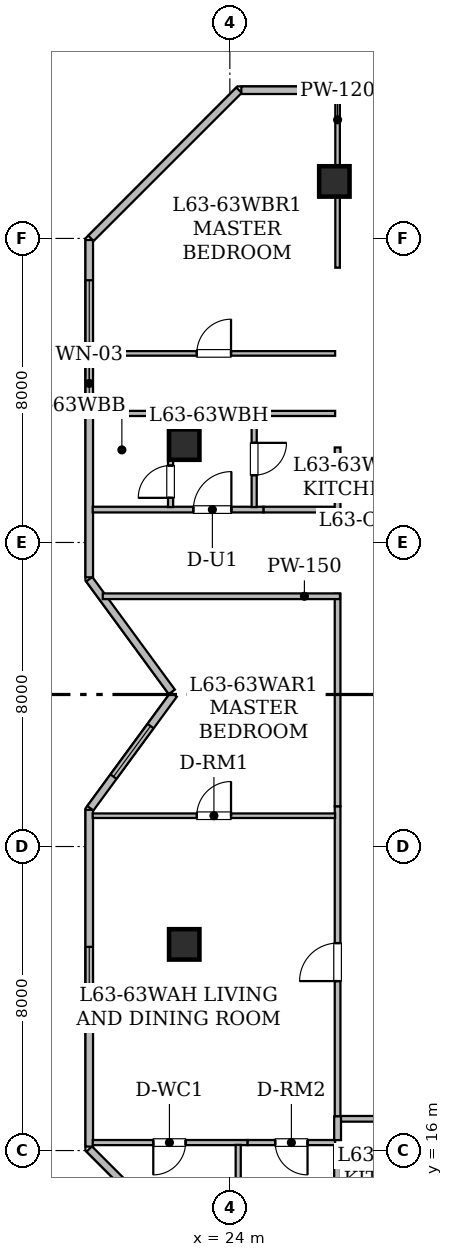
"""IFC4 building model, lengths in metres.
Left out: names, types, materials, properties, quantities, classifications, styles, units other than length and angle.
Written with IfcOpenShell. Run it as: python <this file> out.ifc"""

import sys

from ifc_helpers import new_model, si_unit, direction, frame, frame_2d, origin, origin_2d, place, context, subcontext, project, spatial, rectangle, hollow_rectangle, extrude, element, fill, save


model = new_model("IFC4")
c1 = context("Model", 3, precision=1e-05, world=origin(), true_north=direction((0.0, 1.0)))
c2 = subcontext(c1, "Body", "Model", "MODEL_VIEW")
j1 = project(units=[si_unit("LENGTHUNIT", "METRE"), si_unit("PLANEANGLEUNIT", "RADIAN")], contexts=[c1])
p1 = place(None, origin())
s1 = spatial("IfcSite", under=j1, at=p1, CompositionType="ELEMENT")
p2 = place(p1, origin())
s2 = spatial("IfcBuilding", under=s1, at=p2, CompositionType="ELEMENT")
p3 = place(p2, frame((0.0, 0.0, 246.4)))
s3 = spatial("IfcBuildingStorey", under=s2, at=p3, CompositionType="ELEMENT", Elevation=246.4)
for number, where, z_axis, x_axis in (
    (1, (26.75, 41.5, 0.0), (0.0, 0.0, 1.0), (1.0, 0.0, 0.0)),
    (2, (22.8, 21.425, 0.0), (0.0, 0.0, 1.0), (1.0, 0.0, 0.0)),
    (3, (22.8, 34.575, 0.0), (0.0, 0.0, 1.0), (1.0, 0.0, 0.0)),
):
    element("IfcColumn", number, at=place(p3, frame(where, z_axis=z_axis, x_axis=x_axis)), inside=s3, PredefinedType="COLUMN", context=c2, shape_type="SweptSolid", body=[
        extrude(hollow_rectangle(XDim=0.8, YDim=0.8, WallThickness=0.04, at=origin_2d()), origin(), (0.0, 0.0, 1.0), 3.65),
    ])
p4 = place(p3, frame((24.241, 12.1, 0.0), z_axis=(0.0, 0.0, 1.0), x_axis=(-0.707106781187, 0.707106781187, 0.0)))
e4 = element("IfcWall", 4, at=p4, inside=s3, PredefinedType="STANDARD", context=c2, shape_type="SweptSolid", body=[
    extrude(rectangle(XDim=5.573, YDim=0.2, at=frame_2d((2.787, 0.0))), origin(), (0.0, 0.0, 1.0), 3.43),
])
p5 = place(p3, frame((20.3, 16.104, 0.0), z_axis=(0.0, 0.0, 1.0), x_axis=(0.0, 1.0, 0.0)))
e5 = element("IfcWall", 5, at=p5, inside=s3, PredefinedType="STANDARD", context=c2, shape_type="SweptSolid", body=[
    extrude(rectangle(XDim=8.863, YDim=0.2, at=frame_2d((4.432, 0.0))), origin(), (0.0, 0.0, 1.0), 3.43),
])
p6 = place(p5, frame((3.606, 0.0, 0.85)))
e6 = element("IfcOpeningElement", 6, at=p6, cuts=e5, PredefinedType="OPENING", context=c2, shape_type="SweptSolid", body=[
    extrude(rectangle(XDim=1.65, YDim=1.55, at=frame_2d((0.825, 0.775))), frame((0.0, 0.11, 0.0), z_axis=(0.0, -1.0, 0.0), x_axis=(1.0, 0.0, 0.0)), (0.0, 0.0, 1.0), 0.22),
])
p7 = place(p3, frame((20.329, 25.007, 0.0), z_axis=(0.0, 0.0, 1.0), x_axis=(0.591366515379, 0.806402904564, 0.0)))
e7 = element("IfcWall", 7, at=p7, inside=s3, PredefinedType="STANDARD", context=c2, shape_type="SweptSolid", body=[
    extrude(rectangle(XDim=3.711, YDim=0.2, at=frame_2d((1.856, 0.0))), origin(), (0.0, 0.0, 1.0), 3.43),
])
p8 = place(p7, frame((1.031, 0.0, 0.85)))
e8 = element("IfcOpeningElement", 8, at=p8, cuts=e7, PredefinedType="OPENING", context=c2, shape_type="SweptSolid", body=[
    extrude(rectangle(XDim=1.65, YDim=1.55, at=frame_2d((0.825, 0.775))), frame((0.0, 0.11, 0.0), z_axis=(0.0, -1.0, 0.0), x_axis=(1.0, 0.0, 0.0)), (0.0, 0.0, 1.0), 0.22),
])
p9 = place(p3, frame((22.473, 28.069, 0.0), z_axis=(0.0, 0.0, 1.0), x_axis=(-0.591248456881, 0.80648946815, 0.0)))
e9 = element("IfcWall", 9, at=p9, inside=s3, PredefinedType="STANDARD", context=c2, shape_type="SweptSolid", body=[
    extrude(rectangle(XDim=3.675, YDim=0.2, at=frame_2d((1.837, 0.0))), origin(), (0.0, 0.0, 1.0), 3.43),
])
p10 = place(p3, frame((20.3, 31.084, 0.0), z_axis=(0.0, 0.0, 1.0), x_axis=(0.0, 1.0, 0.0)))
e10 = element("IfcWall", 10, at=p10, inside=s3, PredefinedType="STANDARD", context=c2, shape_type="SweptSolid", body=[
    extrude(rectangle(XDim=8.875, YDim=0.2, at=frame_2d((4.438, 0.0))), origin(), (0.0, 0.0, 1.0), 3.43),
])
p11 = place(p10, frame((4.501, 0.0, 0.8)))
e11 = element("IfcOpeningElement", 11, at=p11, cuts=e10, PredefinedType="OPENING", context=c2, shape_type="SweptSolid", body=[
    extrude(rectangle(XDim=1.2, YDim=1.5, at=frame_2d((0.6, 0.75))), frame((0.0, 0.11, 0.0), z_axis=(0.0, -1.0, 0.0), x_axis=(1.0, 0.0, 0.0)), (0.0, 0.0, 1.0), 0.22),
])
p12 = place(p10, frame((6.166, 0.0, 0.85)))
e12 = element("IfcOpeningElement", 12, at=p12, cuts=e10, PredefinedType="OPENING", context=c2, shape_type="SweptSolid", body=[
    extrude(rectangle(XDim=1.65, YDim=1.55, at=frame_2d((0.825, 0.775))), frame((0.0, 0.11, 0.0), z_axis=(0.0, -1.0, 0.0), x_axis=(1.0, 0.0, 0.0)), (0.0, 0.0, 1.0), 0.22),
])
p13 = place(p3, frame((20.344, 40.003, 0.0), z_axis=(0.0, 0.0, 1.0), x_axis=(0.707106781187, 0.707106781187, 0.0)))
e13 = element("IfcWall", 13, at=p13, inside=s3, PredefinedType="STANDARD", context=c2, shape_type="SweptSolid", body=[
    extrude(rectangle(XDim=5.511, YDim=0.2, at=frame_2d((2.756, 0.0))), origin(), (0.0, 0.0, 1.0), 3.43),
])
p14 = place(p3, frame((24.302, 43.9, 0.0), z_axis=(0.0, 0.0, 1.0), x_axis=(1.0, 0.0, 0.0)))
e14 = element("IfcWall", 14, at=p14, inside=s3, PredefinedType="STANDARD", context=c2, shape_type="SweptSolid", body=[
    extrude(rectangle(XDim=41.457, YDim=0.2, at=frame_2d((20.729, 0.0))), origin(), (0.0, 0.0, 1.0), 3.43),
])
p15 = place(p14, frame((4.673, 0.0, 0.85)))
e15 = element("IfcOpeningElement", 15, at=p15, cuts=e14, PredefinedType="OPENING", context=c2, shape_type="SweptSolid", body=[
    extrude(rectangle(XDim=1.65, YDim=1.55, at=frame_2d((0.825, 0.775))), frame((0.0, 0.11, 0.0), z_axis=(0.0, -1.0, 0.0), x_axis=(1.0, 0.0, 0.0)), (0.0, 0.0, 1.0), 0.22),
])
p16 = place(p14, frame((12.063, 0.0, 0.85)))
e16 = element("IfcOpeningElement", 16, at=p16, cuts=e14, PredefinedType="OPENING", context=c2, shape_type="SweptSolid", body=[
    extrude(rectangle(XDim=1.65, YDim=1.55, at=frame_2d((0.825, 0.775))), frame((0.0, 0.11, 0.0), z_axis=(0.0, -1.0, 0.0), x_axis=(1.0, 0.0, 0.0)), (0.0, 0.0, 1.0), 0.22),
])
p17 = place(p14, frame((14.905, 0.0, 0.85)))
e17 = element("IfcOpeningElement", 17, at=p17, cuts=e14, PredefinedType="OPENING", context=c2, shape_type="SweptSolid", body=[
    extrude(rectangle(XDim=1.65, YDim=1.55, at=frame_2d((0.825, 0.775))), frame((0.0, 0.11, 0.0), z_axis=(0.0, -1.0, 0.0), x_axis=(1.0, 0.0, 0.0)), (0.0, 0.0, 1.0), 0.22),
])
p18 = place(p14, frame((17.825, 0.0, 0.85)))
e18 = element("IfcOpeningElement", 18, at=p18, cuts=e14, PredefinedType="OPENING", context=c2, shape_type="SweptSolid", body=[
    extrude(rectangle(XDim=1.65, YDim=1.55, at=frame_2d((0.825, 0.775))), frame((0.0, 0.11, 0.0), z_axis=(0.0, -1.0, 0.0), x_axis=(1.0, 0.0, 0.0)), (0.0, 0.0, 1.0), 0.22),
])
p19 = place(p14, frame((20.176, 0.0, 0.8)))
e19 = element("IfcOpeningElement", 19, at=p19, cuts=e14, PredefinedType="OPENING", context=c2, shape_type="SweptSolid", body=[
    extrude(rectangle(XDim=1.2, YDim=1.5, at=frame_2d((0.6, 0.75))), frame((0.0, 0.11, 0.0), z_axis=(0.0, -1.0, 0.0), x_axis=(1.0, 0.0, 0.0)), (0.0, 0.0, 1.0), 0.22),
])
p20 = place(p14, frame((22.605, 0.0, 0.85)))
e20 = element("IfcOpeningElement", 20, at=p20, cuts=e14, PredefinedType="OPENING", context=c2, shape_type="SweptSolid", body=[
    extrude(rectangle(XDim=1.65, YDim=1.55, at=frame_2d((0.825, 0.775))), frame((0.0, 0.11, 0.0), z_axis=(0.0, -1.0, 0.0), x_axis=(1.0, 0.0, 0.0)), (0.0, 0.0, 1.0), 0.22),
])
p21 = place(p14, frame((26.664, 0.0, 0.85)))
e21 = element("IfcOpeningElement", 21, at=p21, cuts=e14, PredefinedType="OPENING", context=c2, shape_type="SweptSolid", body=[
    extrude(rectangle(XDim=1.65, YDim=1.55, at=frame_2d((0.825, 0.775))), frame((0.0, 0.11, 0.0), z_axis=(0.0, -1.0, 0.0), x_axis=(1.0, 0.0, 0.0)), (0.0, 0.0, 1.0), 0.22),
])
p22 = place(p14, frame((32.408, 0.0, 0.85)))
e22 = element("IfcOpeningElement", 22, at=p22, cuts=e14, PredefinedType="OPENING", context=c2, shape_type="SweptSolid", body=[
    extrude(rectangle(XDim=1.65, YDim=1.55, at=frame_2d((0.825, 0.775))), frame((0.0, 0.11, 0.0), z_axis=(0.0, -1.0, 0.0), x_axis=(1.0, 0.0, 0.0)), (0.0, 0.0, 1.0), 0.22),
])
p23 = place(p14, frame((38.688, 0.0, 0.85)))
e23 = element("IfcOpeningElement", 23, at=p23, cuts=e14, PredefinedType="OPENING", context=c2, shape_type="SweptSolid", body=[
    extrude(rectangle(XDim=1.65, YDim=1.55, at=frame_2d((0.825, 0.775))), frame((0.0, 0.11, 0.0), z_axis=(0.0, -1.0, 0.0), x_axis=(1.0, 0.0, 0.0)), (0.0, 0.0, 1.0), 0.22),
])
p24 = place(p3, frame((26.835, 16.9, 0.0), z_axis=(0.0, 0.0, 1.0), x_axis=(0.0, 1.0, 0.0)))
e24 = element("IfcWall", 24, at=p24, inside=s3, PredefinedType="STANDARD", context=c2, shape_type="SweptSolid", body=[
    extrude(rectangle(XDim=8.159, YDim=0.15, at=frame_2d((4.08, 0.0))), origin(), (0.0, 0.0, 1.0), 2.687),
])
p25 = place(p24, frame((3.559, 0.0, 0.0)))
e25 = element("IfcOpeningElement", 25, at=p25, cuts=e24, PredefinedType="OPENING", context=c2, shape_type="SweptSolid", body=[
    extrude(rectangle(XDim=1.0, YDim=2.15, at=frame_2d((0.5, 1.075))), frame((0.0, 0.085, 0.0), z_axis=(0.0, -1.0, 0.0), x_axis=(1.0, 0.0, 0.0)), (0.0, 0.0, 1.0), 0.17),
])
p26 = place(p3, frame((26.835, 25.059, 0.0), z_axis=(0.0, 0.0, 1.0), x_axis=(0.0, 1.0, 0.0)))
e26 = element("IfcWall", 26, at=p26, inside=s3, PredefinedType="STANDARD", context=c2, shape_type="SweptSolid", body=[
    extrude(rectangle(XDim=5.591, YDim=0.15, at=frame_2d((2.795, 0.0))), origin(), (0.0, 0.0, 1.0), 3.43),
])
p27 = place(p3, frame((26.898, 30.585, 0.0), z_axis=(0.0, 0.0, 1.0), x_axis=(-1.0, 0.0, 0.0)))
e27 = element("IfcWall", 27, at=p27, inside=s3, PredefinedType="STANDARD", context=c2, shape_type="SweptSolid", body=[
    extrude(rectangle(XDim=6.242, YDim=0.15, at=frame_2d((3.121, 0.0))), origin(), (0.0, 0.0, 1.0), 2.887),
])
p28 = place(p3, frame((20.392, 32.865, 0.0), z_axis=(0.0, 0.0, 1.0), x_axis=(1.0, 0.0, 0.0)))
e28 = element("IfcWall", 28, at=p28, inside=s3, PredefinedType="STANDARD", context=c2, shape_type="SweptSolid", body=[
    extrude(rectangle(XDim=4.497, YDim=0.15, at=frame_2d((2.249, 0.0))), origin(), (0.0, 0.0, 1.0), 2.887),
])
p29 = place(p28, frame((2.648, 0.0, 0.0)))
e29 = element("IfcOpeningElement", 29, at=p29, cuts=e28, PredefinedType="OPENING", context=c2, shape_type="SweptSolid", body=[
    extrude(rectangle(XDim=1.0, YDim=2.15, at=frame_2d((0.5, 1.075))), frame((0.0, 0.085, 0.0), z_axis=(0.0, -1.0, 0.0), x_axis=(1.0, 0.0, 0.0)), (0.0, 0.0, 1.0), 0.17),
])
p30 = place(p3, frame((24.889, 32.865, 0.0), z_axis=(0.0, 0.0, 1.0), x_axis=(1.0, 0.0, 0.0)))
e30 = element("IfcWall", 30, at=p30, inside=s3, PredefinedType="STANDARD", context=c2, shape_type="SweptSolid", body=[
    extrude(rectangle(XDim=2.011, YDim=0.15, at=frame_2d((1.005, 0.0))), origin(), (0.0, 0.0, 1.0), 3.43),
])
p31 = place(p3, frame((26.835, 32.8, 0.0), z_axis=(0.0, 0.0, 1.0), x_axis=(0.0, 1.0, 0.0)))
e31 = element("IfcWall", 31, at=p31, inside=s3, PredefinedType="STANDARD", context=c2, shape_type="SweptSolid", body=[
    extrude(rectangle(XDim=1.7, YDim=0.15, at=frame_2d((0.85, 0.0))), origin(), (0.0, 0.0, 1.0), 2.957),
])
p32 = place(p3, frame((30.751, 16.835, 0.0), z_axis=(0.0, 0.0, 1.0), x_axis=(-1.0, 0.0, 0.0)))
e32 = element("IfcWall", 32, at=p32, inside=s3, PredefinedType="STANDARD", context=c2, shape_type="SweptSolid", body=[
    extrude(rectangle(XDim=3.851, YDim=0.15, at=frame_2d((1.926, 0.0))), origin(), (0.0, 0.0, 1.0), 2.725),
])
p33 = place(p3, frame((26.835, 39.23, 0.0), z_axis=(0.0, 0.0, 1.0), x_axis=(0.0, 1.0, 0.0)))
e33 = element("IfcWall", 33, at=p33, inside=s3, PredefinedType="PARTITIONING", context=c2, shape_type="SweptSolid", body=[
    extrude(rectangle(XDim=4.578, YDim=0.12, at=frame_2d((2.289, 0.0))), origin(), (0.0, 0.0, 1.0), 2.725),
])
p34 = place(p3, frame((24.469, 16.21, 0.0), z_axis=(0.0, 0.0, 1.0), x_axis=(-1.0, 0.0, 0.0)))
e34 = element("IfcWall", 34, at=p34, inside=s3, PredefinedType="PARTITIONING", context=c2, shape_type="SweptSolid", body=[
    extrude(rectangle(XDim=4.077, YDim=0.135, at=frame_2d((2.039, 0.0))), origin(), (0.0, 0.0, 1.0), 3.43),
])
p35 = place(p34, frame((1.634, 0.0, 0.0)))
e35 = element("IfcOpeningElement", 35, at=p35, cuts=e34, PredefinedType="OPENING", context=c2, shape_type="SweptSolid", body=[
    extrude(rectangle(XDim=0.85, YDim=2.1, at=frame_2d((0.425, 1.05))), frame((0.0, 0.077, 0.0), z_axis=(0.0, -1.0, 0.0), x_axis=(1.0, 0.0, 0.0)), (0.0, 0.0, 1.0), 0.155),
])
p36 = place(p3, frame((26.77, 16.21, 0.0), z_axis=(0.0, 0.0, 1.0), x_axis=(-1.0, 0.0, 0.0)))
e36 = element("IfcWall", 36, at=p36, inside=s3, PredefinedType="PARTITIONING", context=c2, shape_type="SweptSolid", body=[
    extrude(rectangle(XDim=2.301, YDim=0.135, at=frame_2d((1.15, 0.0))), origin(), (0.0, 0.0, 1.0), 2.887),
])
p37 = place(p36, frame((0.726, 0.0, 0.0)))
e37 = element("IfcOpeningElement", 37, at=p37, cuts=e36, PredefinedType="OPENING", context=c2, shape_type="SweptSolid", body=[
    extrude(rectangle(XDim=0.85, YDim=2.1, at=frame_2d((0.425, 1.05))), frame((0.0, 0.077, 0.0), z_axis=(0.0, -1.0, 0.0), x_axis=(1.0, 0.0, 0.0)), (0.0, 0.0, 1.0), 0.155),
])
p38 = place(p3, frame((20.392, 24.81, 0.0), z_axis=(0.0, 0.0, 1.0), x_axis=(1.0, 0.0, 0.0)))
e38 = element("IfcWall", 38, at=p38, inside=s3, PredefinedType="PARTITIONING", context=c2, shape_type="SweptSolid", body=[
    extrude(rectangle(XDim=6.378, YDim=0.12, at=frame_2d((3.189, 0.0))), origin(), (0.0, 0.0, 1.0), 2.887),
])
p39 = place(p38, frame((2.739, 0.0, 0.0)))
e39 = element("IfcOpeningElement", 39, at=p39, cuts=e38, PredefinedType="OPENING", context=c2, shape_type="SweptSolid", body=[
    extrude(rectangle(XDim=0.9, YDim=2.1, at=frame_2d((0.45, 1.05))), frame((0.0, 0.07, 0.0), z_axis=(0.0, -1.0, 0.0), x_axis=(1.0, 0.0, 0.0)), (0.0, 0.0, 1.0), 0.14),
])
p40 = place(p3, frame((26.835, 16.9, 0.0), z_axis=(0.0, 0.0, 1.0), x_axis=(0.0, -1.0, 0.0)))
e40 = element("IfcWall", 40, at=p40, inside=s3, PredefinedType="STANDARD", context=c2, shape_type="SweptSolid", body=[
    extrude(rectangle(XDim=0.625, YDim=0.18, at=frame_2d((0.312, 0.0))), origin(), (0.0, 0.0, 1.0), 3.43),
])
p41 = place(p3, frame((24.22, 16.149, 0.0), z_axis=(0.0, 0.0, 1.0), x_axis=(0.0, -1.0, 0.0)))
e41 = element("IfcWall", 41, at=p41, inside=s3, PredefinedType="PARTITIONING", context=c2, shape_type="SweptSolid", body=[
    extrude(rectangle(XDim=3.913, YDim=0.135, at=frame_2d((1.957, 0.0))), origin(), (0.0, 0.0, 1.0), 3.43),
])
p42 = place(p3, frame((26.835, 16.145, 0.0), z_axis=(0.0, 0.0, 1.0), x_axis=(0.0, -1.0, 0.0)))
e42 = element("IfcWall", 42, at=p42, inside=s3, PredefinedType="STANDARD", context=c2, shape_type="SweptSolid", body=[
    extrude(rectangle(XDim=1.636, YDim=0.18, at=frame_2d((0.818, 0.0))), origin(), (0.0, 0.0, 1.0), 2.725),
])
p43 = place(p3, frame((22.44, 32.932, 0.0), z_axis=(0.0, 0.0, 1.0), x_axis=(0.0, 1.0, 0.0)))
e43 = element("IfcWall", 43, at=p43, inside=s3, PredefinedType="PARTITIONING", context=c2, shape_type="SweptSolid", body=[
    extrude(rectangle(XDim=2.528, YDim=0.135, at=frame_2d((1.264, 0.0))), origin(), (0.0, 0.0, 1.0), 3.43),
])
p44 = place(p43, frame((0.242, 0.0, 0.0)))
e44 = element("IfcOpeningElement", 44, at=p44, cuts=e43, PredefinedType="OPENING", context=c2, shape_type="SweptSolid", body=[
    extrude(rectangle(XDim=0.85, YDim=2.1, at=frame_2d((0.425, 1.05))), frame((0.0, 0.077, 0.0), z_axis=(0.0, -1.0, 0.0), x_axis=(1.0, 0.0, 0.0)), (0.0, 0.0, 1.0), 0.155),
])
p45 = place(p3, frame((22.505, 35.395, 0.0), z_axis=(0.0, 0.0, 1.0), x_axis=(-1.0, 0.0, 0.0)))
e45 = element("IfcWall", 45, at=p45, inside=s3, PredefinedType="PARTITIONING", context=c2, shape_type="SweptSolid", body=[
    extrude(rectangle(XDim=2.113, YDim=0.135, at=frame_2d((1.056, 0.0))), origin(), (0.0, 0.0, 1.0), 3.43),
])
p46 = place(p3, frame((26.77, 35.395, 0.0), z_axis=(0.0, 0.0, 1.0), x_axis=(-1.0, 0.0, 0.0)))
e46 = element("IfcWall", 46, at=p46, inside=s3, PredefinedType="PARTITIONING", context=c2, shape_type="SweptSolid", body=[
    extrude(rectangle(XDim=2.195, YDim=0.135, at=frame_2d((1.098, 0.0))), origin(), (0.0, 0.0, 1.0), 2.725),
])
p47 = place(p3, frame((24.64, 35.46, 0.0), z_axis=(0.0, 0.0, 1.0), x_axis=(0.0, -1.0, 0.0)))
e47 = element("IfcWall", 47, at=p47, inside=s3, PredefinedType="PARTITIONING", context=c2, shape_type="SweptSolid", body=[
    extrude(rectangle(XDim=2.528, YDim=0.135, at=frame_2d((1.264, 0.0))), origin(), (0.0, 0.0, 1.0), 2.725),
])
p48 = place(p47, frame((0.839, 0.0, 0.0)))
e48 = element("IfcOpeningElement", 48, at=p48, cuts=e47, PredefinedType="OPENING", context=c2, shape_type="SweptSolid", body=[
    extrude(rectangle(XDim=0.85, YDim=2.1, at=frame_2d((0.425, 1.05))), frame((0.0, 0.077, 0.0), z_axis=(0.0, -1.0, 0.0), x_axis=(1.0, 0.0, 0.0)), (0.0, 0.0, 1.0), 0.155),
])
p49 = place(p3, frame((20.392, 36.975, 0.0), z_axis=(0.0, 0.0, 1.0), x_axis=(1.0, 0.0, 0.0)))
e49 = element("IfcWall", 49, at=p49, inside=s3, PredefinedType="PARTITIONING", context=c2, shape_type="SweptSolid", body=[
    extrude(rectangle(XDim=6.378, YDim=0.12, at=frame_2d((3.189, 0.0))), origin(), (0.0, 0.0, 1.0), 2.887),
])
p50 = place(p49, frame((2.739, 0.0, 0.0)))
e50 = element("IfcOpeningElement", 50, at=p50, cuts=e49, PredefinedType="OPENING", context=c2, shape_type="SweptSolid", body=[
    extrude(rectangle(XDim=0.9, YDim=2.1, at=frame_2d((0.45, 1.05))), frame((0.0, 0.07, 0.0), z_axis=(0.0, -1.0, 0.0), x_axis=(1.0, 0.0, 0.0)), (0.0, 0.0, 1.0), 0.14),
])
p51 = place(p6, origin())
e51 = element("IfcWindow", 51, at=p51, inside=s3, PartitioningType="SINGLE_PANEL", PredefinedType="WINDOW", context=c2, shape_type="SweptSolid", body=[
    extrude(rectangle(XDim=1.65, YDim=1.55, at=frame_2d((0.825, 0.775))), frame((0.0, 0.03, 0.0), z_axis=(0.0, -1.0, 0.0), x_axis=(1.0, 0.0, 0.0)), (0.0, 0.0, 1.0), 0.06),
])
fill(e6, e51)
p52 = place(p8, origin())
e52 = element("IfcWindow", 52, at=p52, inside=s3, PartitioningType="SINGLE_PANEL", PredefinedType="WINDOW", context=c2, shape_type="SweptSolid", body=[
    extrude(rectangle(XDim=1.65, YDim=1.55, at=frame_2d((0.825, 0.775))), frame((0.0, 0.03, 0.0), z_axis=(0.0, -1.0, 0.0), x_axis=(1.0, 0.0, 0.0)), (0.0, 0.0, 1.0), 0.06),
])
fill(e8, e52)
p53 = place(p11, origin())
e53 = element("IfcWindow", 53, at=p53, inside=s3, PartitioningType="SINGLE_PANEL", PredefinedType="WINDOW", context=c2, shape_type="SweptSolid", body=[
    extrude(rectangle(XDim=1.2, YDim=1.5, at=frame_2d((0.6, 0.75))), frame((0.0, 0.03, 0.0), z_axis=(0.0, -1.0, 0.0), x_axis=(1.0, 0.0, 0.0)), (0.0, 0.0, 1.0), 0.06),
])
fill(e11, e53)
p54 = place(p12, origin())
e54 = element("IfcWindow", 54, at=p54, inside=s3, PartitioningType="SINGLE_PANEL", PredefinedType="WINDOW", context=c2, shape_type="SweptSolid", body=[
    extrude(rectangle(XDim=1.65, YDim=1.55, at=frame_2d((0.825, 0.775))), frame((0.0, 0.03, 0.0), z_axis=(0.0, -1.0, 0.0), x_axis=(1.0, 0.0, 0.0)), (0.0, 0.0, 1.0), 0.06),
])
fill(e12, e54)
p55 = place(p25, origin())
e55 = element("IfcDoor", 55, at=p55, inside=s3, OperationType="SINGLE_SWING_LEFT", PredefinedType="DOOR", context=c2, shape_type="SweptSolid", body=[
    extrude(rectangle(XDim=1.0, YDim=2.15, at=frame_2d((0.5, 1.075))), frame((0.0, 0.025, 0.0), z_axis=(0.0, -1.0, 0.0), x_axis=(1.0, 0.0, 0.0)), (0.0, 0.0, 1.0), 0.05),
])
fill(e25, e55)
p56 = place(p29, origin())
e56 = element("IfcDoor", 56, at=p56, inside=s3, OperationType="SINGLE_SWING_RIGHT", PredefinedType="DOOR", context=c2, shape_type="SweptSolid", body=[
    extrude(rectangle(XDim=1.0, YDim=2.15, at=frame_2d((0.5, 1.075))), frame((0.0, 0.025, 0.0), z_axis=(0.0, -1.0, 0.0), x_axis=(1.0, 0.0, 0.0)), (0.0, 0.0, 1.0), 0.05),
])
fill(e29, e56)
p57 = place(p35, origin())
e57 = element("IfcDoor", 57, at=p57, inside=s3, OperationType="SINGLE_SWING_RIGHT", PredefinedType="DOOR", context=c2, shape_type="SweptSolid", body=[
    extrude(rectangle(XDim=0.85, YDim=2.1, at=frame_2d((0.425, 1.05))), frame((0.0, 0.025, 0.0), z_axis=(0.0, -1.0, 0.0), x_axis=(1.0, 0.0, 0.0)), (0.0, 0.0, 1.0), 0.05),
])
fill(e35, e57)
p58 = place(p37, origin())
e58 = element("IfcDoor", 58, at=p58, inside=s3, OperationType="SINGLE_SWING_LEFT", PredefinedType="DOOR", context=c2, shape_type="SweptSolid", body=[
    extrude(rectangle(XDim=0.85, YDim=2.1, at=frame_2d((0.425, 1.05))), frame((0.0, 0.025, 0.0), z_axis=(0.0, -1.0, 0.0), x_axis=(1.0, 0.0, 0.0)), (0.0, 0.0, 1.0), 0.05),
])
fill(e37, e58)
p59 = place(p39, origin())
e59 = element("IfcDoor", 59, at=p59, inside=s3, OperationType="SINGLE_SWING_RIGHT", PredefinedType="DOOR", context=c2, shape_type="SweptSolid", body=[
    extrude(rectangle(XDim=0.9, YDim=2.1, at=frame_2d((0.45, 1.05))), frame((0.0, 0.025, 0.0), z_axis=(0.0, -1.0, 0.0), x_axis=(1.0, 0.0, 0.0)), (0.0, 0.0, 1.0), 0.05),
])
fill(e39, e59)
p60 = place(p44, origin())
e60 = element("IfcDoor", 60, at=p60, inside=s3, OperationType="SINGLE_SWING_LEFT", PredefinedType="DOOR", context=c2, shape_type="SweptSolid", body=[
    extrude(rectangle(XDim=0.85, YDim=2.1, at=frame_2d((0.425, 1.05))), frame((0.0, 0.025, 0.0), z_axis=(0.0, -1.0, 0.0), x_axis=(1.0, 0.0, 0.0)), (0.0, 0.0, 1.0), 0.05),
])
fill(e44, e60)
p61 = place(p48, origin())
e61 = element("IfcDoor", 61, at=p61, inside=s3, OperationType="SINGLE_SWING_LEFT", PredefinedType="DOOR", context=c2, shape_type="SweptSolid", body=[
    extrude(rectangle(XDim=0.85, YDim=2.1, at=frame_2d((0.425, 1.05))), frame((0.0, 0.025, 0.0), z_axis=(0.0, -1.0, 0.0), x_axis=(1.0, 0.0, 0.0)), (0.0, 0.0, 1.0), 0.05),
])
fill(e48, e61)
p62 = place(p50, origin())
e62 = element("IfcDoor", 62, at=p62, inside=s3, OperationType="SINGLE_SWING_RIGHT", PredefinedType="DOOR", context=c2, shape_type="SweptSolid", body=[
    extrude(rectangle(XDim=0.9, YDim=2.1, at=frame_2d((0.45, 1.05))), frame((0.0, 0.025, 0.0), z_axis=(0.0, -1.0, 0.0), x_axis=(1.0, 0.0, 0.0)), (0.0, 0.0, 1.0), 0.05),
])
fill(e50, e62)
save(model, sys.argv[1])
